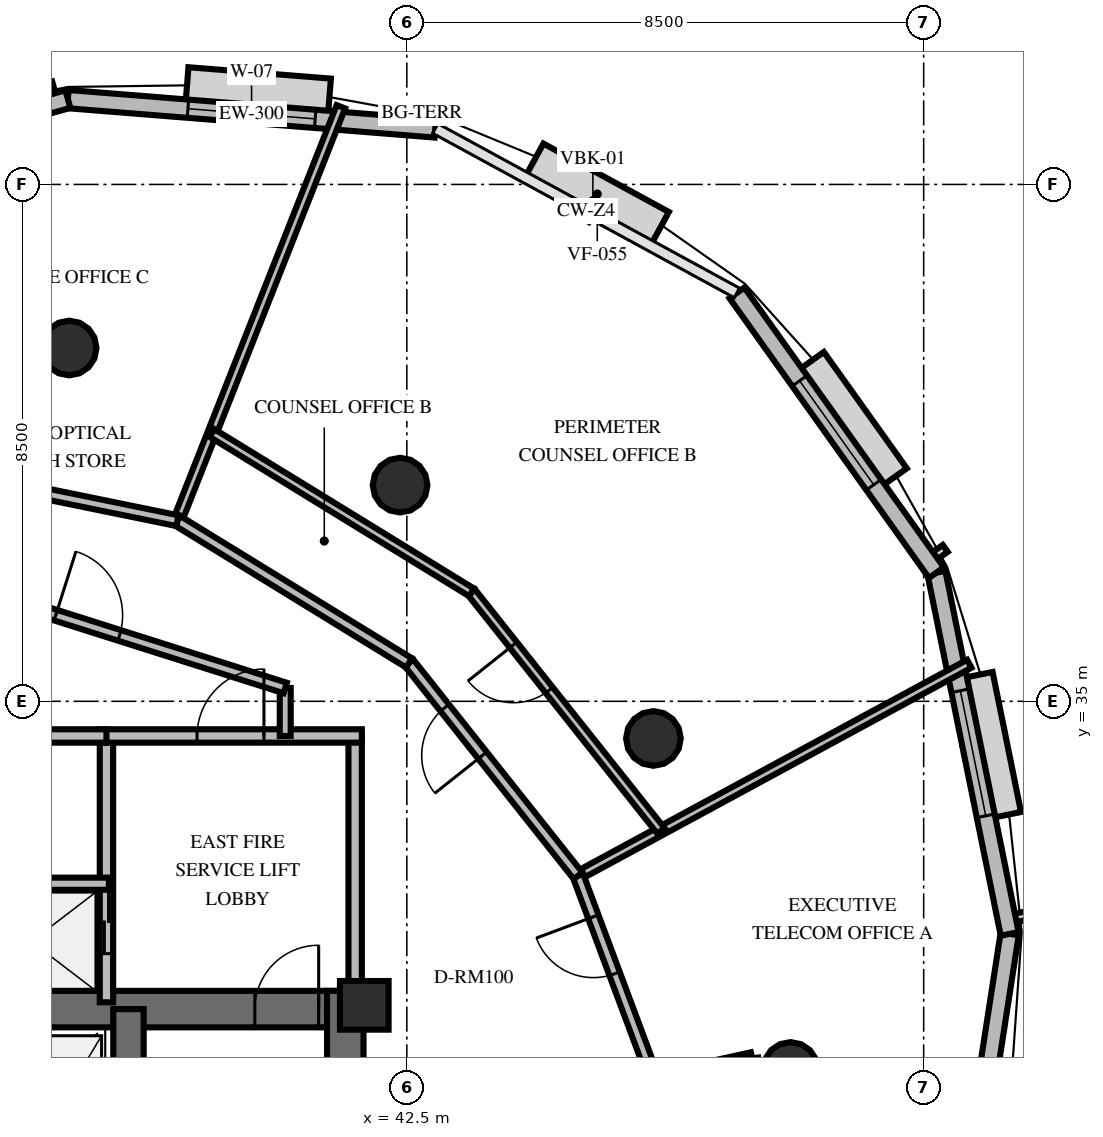
"""IFC4 building model, lengths in metres.
Left out: names, types, materials, properties, quantities, classifications, styles, units other than length and angle.
Written with IfcOpenShell. Run it as: python <this file> out.ifc"""

import sys

from ifc_helpers import new_model, si_unit, direction, frame, frame_2d, origin, origin_2d, place, context, subcontext, project, spatial, rectangle, circle, extrude, element, fill, save


model = new_model("IFC4")
c1 = context("Model", 3, precision=1e-05, world=origin(), true_north=direction((0.0, 1.0)))
c2 = subcontext(c1, "Body", "Model", "MODEL_VIEW")
j1 = project(units=[si_unit("LENGTHUNIT", "METRE"), si_unit("PLANEANGLEUNIT", "RADIAN")], contexts=[c1])
p1 = place(None, origin())
s1 = spatial("IfcSite", under=j1, at=p1, CompositionType="ELEMENT")
p2 = place(p1, origin())
s2 = spatial("IfcBuilding", under=s1, at=p2, CompositionType="ELEMENT")
p3 = place(p2, frame((0.0, 0.0, 234.0)))
s3 = spatial("IfcBuildingStorey", under=s2, at=p3, CompositionType="ELEMENT", Elevation=234.0)
p4 = place(p3, frame((26.222, 29.938, 0.0), z_axis=(0.0, 0.0, 1.0), x_axis=(1.0, 0.0, 0.0)))
e1 = element("IfcWall", 1, at=p4, inside=s3, PredefinedType="SHEAR", context=c2, shape_type="SweptSolid", body=[
    extrude(rectangle(XDim=15.566, YDim=0.6, at=frame_2d((7.783, 0.0))), origin(), (0.0, 0.0, 1.0), 3.6),
])
p5 = place(p4, frame((0.728, 0.0, 0.0)))
e2 = element("IfcOpeningElement", 2, at=p5, cuts=e1, PredefinedType="OPENING", context=c2, shape_type="SweptSolid", body=[
    extrude(rectangle(XDim=1.05, YDim=2.15, at=frame_2d((0.525, 1.075))), frame((0.0, 0.31, 0.0), z_axis=(0.0, -1.0, 0.0), x_axis=(1.0, 0.0, 0.0)), (0.0, 0.0, 1.0), 0.62),
])
p6 = place(p4, frame((13.778, 0.0, 0.0)))
e3 = element("IfcOpeningElement", 3, at=p6, cuts=e1, PredefinedType="OPENING", context=c2, shape_type="SweptSolid", body=[
    extrude(rectangle(XDim=1.05, YDim=2.15, at=frame_2d((0.525, 1.075))), frame((0.0, 0.31, 0.0), z_axis=(0.0, -1.0, 0.0), x_axis=(1.0, 0.0, 0.0)), (0.0, 0.0, 1.0), 0.62),
])
p7 = place(p4, frame((7.228, 0.0, 0.0)))
e4 = element("IfcOpeningElement", 4, at=p7, cuts=e1, PredefinedType="OPENING", context=c2, shape_type="SweptSolid", body=[
    extrude(rectangle(XDim=1.1, YDim=2.15, at=frame_2d((0.55, 1.075))), frame((0.0, 0.31, 0.0), z_axis=(0.0, -1.0, 0.0), x_axis=(1.0, 0.0, 0.0)), (0.0, 0.0, 1.0), 0.62),
])
p8 = place(p3, frame((41.488, 19.962, 0.0), z_axis=(0.0, 0.0, 1.0), x_axis=(0.0, 1.0, 0.0)))
e5 = element("IfcWall", 5, at=p8, inside=s3, PredefinedType="SHEAR", context=c2, shape_type="SweptSolid", body=[
    extrude(rectangle(XDim=10.276, YDim=0.6, at=frame_2d((5.138, 0.0))), origin(), (0.0, 0.0, 1.0), 3.6),
])
p9 = place(p3, frame((37.922, 20.262, 0.0), z_axis=(0.0, 0.0, 1.0), x_axis=(0.0, 1.0, 0.0)))
e6 = element("IfcWall", 6, at=p9, inside=s3, PredefinedType="SHEAR", context=c2, shape_type="SweptSolid", body=[
    extrude(rectangle(XDim=9.676, YDim=0.5, at=frame_2d((4.838, 0.0))), origin(), (0.0, 0.0, 1.0), 3.6),
])
p10 = place(p3, frame((41.8, 30.0, 0.0), z_axis=(0.0, 0.0, 1.0), x_axis=(1.0, 0.0, 0.0)))
e7 = element("IfcColumn", 7, at=p10, inside=s3, PredefinedType="PILASTER", context=c2, shape_type="SweptSolid", body=[
    extrude(rectangle(XDim=0.8, YDim=0.8, at=origin_2d()), origin(), (0.0, 0.0, 1.0), 3.6),
])
for number, where, z_axis, x_axis in (
    (8, (48.81, 28.946, 0.0), (0.0, 0.0, 1.0), (1.0, 0.0, 0.0)),
    (9, (46.555, 34.389, 0.0), (0.0, 0.0, 1.0), (1.0, 0.0, 0.0)),
    (10, (42.389, 38.555, 0.0), (0.0, 0.0, 1.0), (1.0, 0.0, 0.0)),
    (11, (36.946, 40.81, 0.0), (0.0, 0.0, 1.0), (1.0, 0.0, 0.0)),
):
    element("IfcColumn", number, at=place(p3, frame(where, z_axis=z_axis, x_axis=x_axis)), inside=s3, PredefinedType="COLUMN", context=c2, shape_type="SweptSolid", body=[
        extrude(circle(Radius=0.45, at=origin_2d()), origin(), (0.0, 0.0, 1.0), 3.6),
    ])
p11 = place(p3, frame((42.968, 44.42, 0.0), z_axis=(0.0, 0.0, 1.0), x_axis=(-0.996821678443, 0.079665183029, 0.0)))
e12 = element("IfcWall", 12, at=p11, inside=s3, PredefinedType="SOLIDWALL", context=c2, shape_type="SweptSolid", body=[
    extrude(rectangle(XDim=6.062, YDim=0.3, at=frame_2d((3.031, 0.0))), origin(), (0.0, 0.0, 1.0), 2.76),
])
p12 = place(p11, frame((1.981, 0.0, 0.8)))
e13 = element("IfcOpeningElement", 13, at=p12, cuts=e12, PredefinedType="OPENING", context=c2, shape_type="SweptSolid", body=[
    extrude(rectangle(XDim=2.1, YDim=1.85, at=frame_2d((1.05, 0.925))), frame((0.0, 0.16, 0.0), z_axis=(0.0, -1.0, 0.0), x_axis=(1.0, 0.0, 0.0)), (0.0, 0.0, 1.0), 0.32),
])
p13 = place(p3, frame((36.925, 44.903, 0.0), z_axis=(0.0, 0.0, 1.0), x_axis=(-0.962704799022, -0.270554005589, 0.0)))
e14 = element("IfcWall", 14, at=p13, inside=s3, PredefinedType="SOLIDWALL", context=c2, shape_type="SweptSolid", body=[
    extrude(rectangle(XDim=6.643, YDim=0.3, at=frame_2d((3.322, 0.0))), origin(), (0.0, 0.0, 1.0), 2.76),
])
p14 = place(p13, frame((2.272, 0.0, 0.8)))
e15 = element("IfcOpeningElement", 15, at=p14, cuts=e14, PredefinedType="OPENING", context=c2, shape_type="SweptSolid", body=[
    extrude(rectangle(XDim=2.1, YDim=1.85, at=frame_2d((1.05, 0.925))), frame((0.0, 0.16, 0.0), z_axis=(0.0, -1.0, 0.0), x_axis=(1.0, 0.0, 0.0)), (0.0, 0.0, 1.0), 0.32),
])
p15 = place(p3, frame((51.399, 24.61, 0.0), z_axis=(0.0, 0.0, 1.0), x_axis=(0.15291596783, 0.988239195126, 0.0)))
e16 = element("IfcWall", 16, at=p15, inside=s3, PredefinedType="SOLIDWALL", context=c2, shape_type="SweptSolid", body=[
    extrude(rectangle(XDim=6.643, YDim=0.3, at=frame_2d((3.322, 0.0))), origin(), (0.0, 0.0, 1.0), 2.76),
])
p16 = place(p15, frame((2.272, 0.0, 0.8)))
e17 = element("IfcOpeningElement", 17, at=p16, cuts=e16, PredefinedType="OPENING", context=c2, shape_type="SweptSolid", body=[
    extrude(rectangle(XDim=2.1, YDim=1.85, at=frame_2d((1.05, 0.925))), frame((0.0, 0.16, 0.0), z_axis=(0.0, -1.0, 0.0), x_axis=(1.0, 0.0, 0.0)), (0.0, 0.0, 1.0), 0.32),
])
p17 = place(p3, frame((52.415, 31.175, 0.0), z_axis=(0.0, 0.0, 1.0), x_axis=(-0.198803056685, 0.980039460763, 0.0)))
e18 = element("IfcWall", 18, at=p17, inside=s3, PredefinedType="SOLIDWALL", context=c2, shape_type="SweptSolid", body=[
    extrude(rectangle(XDim=6.062, YDim=0.3, at=frame_2d((3.031, 0.0))), origin(), (0.0, 0.0, 1.0), 2.76),
])
p18 = place(p17, frame((1.981, 0.0, 0.8)))
e19 = element("IfcOpeningElement", 19, at=p18, cuts=e18, PredefinedType="OPENING", context=c2, shape_type="SweptSolid", body=[
    extrude(rectangle(XDim=2.1, YDim=1.85, at=frame_2d((1.05, 0.925))), frame((0.0, 0.16, 0.0), z_axis=(0.0, -1.0, 0.0), x_axis=(1.0, 0.0, 0.0)), (0.0, 0.0, 1.0), 0.32),
])
p19 = place(p3, frame((51.21, 37.116, 0.0), z_axis=(0.0, 0.0, 1.0), x_axis=(-0.580678098199, 0.814133248475, 0.0)))
e20 = element("IfcWall", 20, at=p19, inside=s3, PredefinedType="SOLIDWALL", context=c2, shape_type="SweptSolid", body=[
    extrude(rectangle(XDim=5.65, YDim=0.3, at=frame_2d((2.825, 0.0))), origin(), (0.0, 0.0, 1.0), 2.76),
])
p20 = place(p19, frame((1.775, 0.0, 0.8)))
e21 = element("IfcOpeningElement", 21, at=p20, cuts=e20, PredefinedType="OPENING", context=c2, shape_type="SweptSolid", body=[
    extrude(rectangle(XDim=2.1, YDim=1.85, at=frame_2d((1.05, 0.925))), frame((0.0, 0.16, 0.0), z_axis=(0.0, -1.0, 0.0), x_axis=(1.0, 0.0, 0.0)), (0.0, 0.0, 1.0), 0.32),
])
p21 = place(p3, frame((37.56, 30.05, 0.0), z_axis=(0.0, 0.0, 1.0), x_axis=(0.0, 1.0, 0.0)))
e22 = element("IfcWall", 22, at=p21, inside=s3, PredefinedType="SOLIDWALL", context=c2, shape_type="SweptSolid", body=[
    extrude(rectangle(XDim=4.38, YDim=0.22, at=frame_2d((2.19, 0.0))), origin(), (0.0, 0.0, 1.0), 2.46),
])
p22 = place(p21, frame((0.8, 0.0, 0.0)))
e23 = element("IfcOpeningElement", 23, at=p22, cuts=e22, PredefinedType="OPENING", context=c2, shape_type="SweptSolid", body=[
    extrude(rectangle(XDim=1.05, YDim=2.1, at=frame_2d((0.525, 1.05))), frame((0.0, 0.12, 0.0), z_axis=(0.0, -1.0, 0.0), x_axis=(1.0, 0.0, 0.0)), (0.0, 0.0, 1.0), 0.24),
])
p23 = place(p3, frame((41.65, 30.05, 0.0), z_axis=(0.0, 0.0, 1.0), x_axis=(0.0, 1.0, 0.0)))
e24 = element("IfcWall", 24, at=p23, inside=s3, PredefinedType="SOLIDWALL", context=c2, shape_type="SweptSolid", body=[
    extrude(rectangle(XDim=4.38, YDim=0.22, at=frame_2d((2.19, 0.0))), origin(), (0.0, 0.0, 1.0), 2.46),
])
p24 = place(p3, frame((37.45, 34.43, 0.0), z_axis=(0.0, 0.0, 1.0), x_axis=(1.0, 0.0, 0.0)))
e25 = element("IfcWall", 25, at=p24, inside=s3, PredefinedType="SOLIDWALL", context=c2, shape_type="SweptSolid", body=[
    extrude(rectangle(XDim=4.31, YDim=0.22, at=frame_2d((2.155, 0.0))), origin(), (0.0, 0.0, 1.0), 2.46),
])
p25 = place(p24, frame((1.6, 0.0, 0.0)))
e26 = element("IfcOpeningElement", 26, at=p25, cuts=e25, PredefinedType="OPENING", context=c2, shape_type="SweptSolid", body=[
    extrude(rectangle(XDim=1.1, YDim=2.15, at=frame_2d((0.55, 1.075))), frame((0.0, 0.12, 0.0), z_axis=(0.0, -1.0, 0.0), x_axis=(1.0, 0.0, 0.0)), (0.0, 0.0, 1.0), 0.24),
])
p26 = place(p3, frame((35.05, 32.0, 0.0), z_axis=(0.0, 0.0, 1.0), x_axis=(1.0, 0.0, 0.0)))
e27 = element("IfcWall", 27, at=p26, inside=s3, PredefinedType="SOLIDWALL", context=c2, shape_type="SweptSolid", body=[
    extrude(rectangle(XDim=2.55, YDim=0.2, at=frame_2d((1.275, 0.0))), origin(), (0.0, 0.0, 1.0), 2.46),
])
p27 = place(p3, frame((30.44, 34.43, 0.0), z_axis=(0.0, 0.0, 1.0), x_axis=(1.0, 0.0, 0.0)))
e28 = element("IfcWall", 28, at=p27, inside=s3, PredefinedType="SOLIDWALL", context=c2, shape_type="SweptSolid", body=[
    extrude(rectangle(XDim=7.12, YDim=0.22, at=frame_2d((3.56, 0.0))), origin(), (0.0, 0.0, 1.0), 2.46),
])
p28 = place(p27, frame((3.01, 0.0, 0.0)))
e29 = element("IfcOpeningElement", 29, at=p28, cuts=e28, PredefinedType="OPENING", context=c2, shape_type="SweptSolid", body=[
    extrude(rectangle(XDim=1.1, YDim=2.15, at=frame_2d((0.55, 1.075))), frame((0.0, 0.12, 0.0), z_axis=(0.0, -1.0, 0.0), x_axis=(1.0, 0.0, 0.0)), (0.0, 0.0, 1.0), 0.24),
])
p29 = place(p3, frame((40.5, 35.219, 0.0), z_axis=(0.0, 0.0, 1.0), x_axis=(0.0, -1.0, 0.0)))
e30 = element("IfcWall", 30, at=p29, inside=s3, PredefinedType="PARTITIONING", context=c2, shape_type="SweptSolid", body=[
    extrude(rectangle(XDim=0.789, YDim=0.18, at=frame_2d((0.395, 0.0))), origin(), (0.0, 0.0, 1.0), 2.46),
])
p30 = place(p3, frame((34.0, 37.28, 0.0), z_axis=(0.0, 0.0, 1.0), x_axis=(0.953228121756, -0.302251795518, 0.0)))
e31 = element("IfcWall", 31, at=p30, inside=s3, PredefinedType="PARTITIONING", context=c2, shape_type="SweptSolid", body=[
    extrude(rectangle(XDim=6.819, YDim=0.18, at=frame_2d((3.409, 0.0))), origin(), (0.0, 0.0, 1.0), 2.46),
])
p31 = place(p30, frame((2.86, 0.0, 0.0)))
e32 = element("IfcOpeningElement", 32, at=p31, cuts=e31, PredefinedType="OPENING", context=c2, shape_type="SweptSolid", body=[
    extrude(rectangle(XDim=1.1, YDim=2.15, at=frame_2d((0.55, 1.075))), frame((0.0, 0.1, 0.0), z_axis=(0.0, -1.0, 0.0), x_axis=(1.0, 0.0, 0.0)), (0.0, 0.0, 1.0), 0.2),
])
p32 = place(p3, frame((46.567, 28.775, 0.0), z_axis=(0.0, 0.0, 1.0), x_axis=(0.976488977009, 0.215567339318, 0.0)))
e33 = element("IfcWall", 33, at=p32, inside=s3, PredefinedType="PLUMBINGWALL", context=c2, shape_type="SweptSolid", body=[
    extrude(rectangle(XDim=1.65, YDim=0.2, at=frame_2d((0.825, 0.0))), origin(), (0.0, 0.0, 1.0), 2.46),
])
p33 = place(p3, frame((45.316, 32.131, 0.0), z_axis=(0.0, 0.0, 1.0), x_axis=(0.879230834662, 0.476395990096, 0.0)))
e34 = element("IfcWall", 34, at=p33, inside=s3, PredefinedType="PARTITIONING", context=c2, shape_type="SweptSolid", body=[
    extrude(rectangle(XDim=7.318, YDim=0.15, at=frame_2d((3.659, 0.0))), origin(), (0.0, 0.0, 1.0), 2.46),
])
p34 = place(p3, frame((46.567, 28.775, 0.0), z_axis=(0.0, 0.0, 1.0), x_axis=(-0.349419971737, 0.936966212492, 0.0)))
e35 = element("IfcWall", 35, at=p34, inside=s3, PredefinedType="PARTITIONING", context=c2, shape_type="SweptSolid", body=[
    extrude(rectangle(XDim=3.582, YDim=0.18, at=frame_2d((1.791, 0.0))), origin(), (0.0, 0.0, 1.0), 2.46),
])
p35 = place(p34, frame((1.862, 0.0, 0.0)))
e36 = element("IfcOpeningElement", 36, at=p35, cuts=e35, PredefinedType="OPENING", context=c2, shape_type="SweptSolid", body=[
    extrude(rectangle(XDim=1.0, YDim=2.15, at=frame_2d((0.5, 1.075))), frame((0.0, 0.1, 0.0), z_axis=(0.0, -1.0, 0.0), x_axis=(1.0, 0.0, 0.0)), (0.0, 0.0, 1.0), 0.2),
])
p36 = place(p3, frame((38.727, 37.97, 0.0), z_axis=(0.0, 0.0, 1.0), x_axis=(0.367303252397, 0.93010124222, 0.0)))
e37 = element("IfcWall", 37, at=p36, inside=s3, PredefinedType="PARTITIONING", context=c2, shape_type="SweptSolid", body=[
    extrude(rectangle(XDim=7.318, YDim=0.15, at=frame_2d((3.659, 0.0))), origin(), (0.0, 0.0, 1.0), 2.46),
])
p37 = place(p3, frame((45.316, 32.131, 0.0), z_axis=(0.0, 0.0, 1.0), x_axis=(-0.621813175889, 0.783165611024, 0.0)))
e38 = element("IfcWall", 38, at=p37, inside=s3, PredefinedType="PARTITIONING", context=c2, shape_type="SweptSolid", body=[
    extrude(rectangle(XDim=4.47, YDim=0.18, at=frame_2d((2.235, 0.0))), origin(), (0.0, 0.0, 1.0), 2.46),
])
p38 = place(p37, frame((2.527, 0.0, 0.0)))
e39 = element("IfcOpeningElement", 39, at=p38, cuts=e38, PredefinedType="OPENING", context=c2, shape_type="SweptSolid", body=[
    extrude(rectangle(XDim=1.0, YDim=2.15, at=frame_2d((0.5, 1.075))), frame((0.0, 0.1, 0.0), z_axis=(0.0, -1.0, 0.0), x_axis=(1.0, 0.0, 0.0)), (0.0, 0.0, 1.0), 0.2),
])
p39 = place(p3, frame((42.536, 35.632, 0.0), z_axis=(0.0, 0.0, 1.0), x_axis=(-0.852175498572, 0.523256074626, 0.0)))
e40 = element("IfcWall", 40, at=p39, inside=s3, PredefinedType="PARTITIONING", context=c2, shape_type="SweptSolid", body=[
    extrude(rectangle(XDim=4.47, YDim=0.18, at=frame_2d((2.235, 0.0))), origin(), (0.0, 0.0, 1.0), 2.46),
])
p40 = place(p3, frame((46.678, 32.87, 0.0), z_axis=(0.0, 0.0, 1.0), x_axis=(-0.621831140241, 0.783151347459, 0.0)))
e41 = element("IfcWall", 41, at=p40, inside=s3, PredefinedType="PARTITIONING", context=c2, shape_type="SweptSolid", body=[
    extrude(rectangle(XDim=5.008, YDim=0.15, at=frame_2d((2.504, 0.0))), origin(), (0.0, 0.0, 1.0), 2.46),
])
p41 = place(p40, frame((2.954, 0.0, 0.0)))
e42 = element("IfcOpeningElement", 42, at=p41, cuts=e41, PredefinedType="OPENING", context=c2, shape_type="SweptSolid", body=[
    extrude(rectangle(XDim=0.95, YDim=2.15, at=frame_2d((0.475, 1.075))), frame((0.0, 0.085, 0.0), z_axis=(0.0, -1.0, 0.0), x_axis=(1.0, 0.0, 0.0)), (0.0, 0.0, 1.0), 0.17),
])
p42 = place(p3, frame((43.564, 36.792, 0.0), z_axis=(0.0, 0.0, 1.0), x_axis=(-0.852170081645, 0.523264896538, 0.0)))
e43 = element("IfcWall", 43, at=p42, inside=s3, PredefinedType="PARTITIONING", context=c2, shape_type="SweptSolid", body=[
    extrude(rectangle(XDim=5.008, YDim=0.15, at=frame_2d((2.504, 0.0))), origin(), (0.0, 0.0, 1.0), 2.46),
])
p43 = place(p3, frame((38.727, 37.97, 0.0), z_axis=(0.0, 0.0, 1.0), x_axis=(-0.979757075519, 0.200190092088, 0.0)))
e44 = element("IfcWall", 44, at=p43, inside=s3, PredefinedType="PARTITIONING", context=c2, shape_type="SweptSolid", body=[
    extrude(rectangle(XDim=4.47, YDim=0.18, at=frame_2d((2.235, 0.0))), origin(), (0.0, 0.0, 1.0), 2.46),
])
p44 = place(p12, origin())
e45 = element("IfcWindow", 45, at=p44, inside=s3, PartitioningType="SINGLE_PANEL", PredefinedType="WINDOW", context=c2, shape_type="SweptSolid", body=[
    extrude(rectangle(XDim=2.1, YDim=1.85, at=frame_2d((1.05, 0.925))), frame((0.0, 0.03, 0.0), z_axis=(0.0, -1.0, 0.0), x_axis=(1.0, 0.0, 0.0)), (0.0, 0.0, 1.0), 0.06),
])
fill(e13, e45)
p45 = place(p18, origin())
e46 = element("IfcWindow", 46, at=p45, inside=s3, PartitioningType="SINGLE_PANEL", PredefinedType="WINDOW", context=c2, shape_type="SweptSolid", body=[
    extrude(rectangle(XDim=2.1, YDim=1.85, at=frame_2d((1.05, 0.925))), frame((0.0, 0.03, 0.0), z_axis=(0.0, -1.0, 0.0), x_axis=(1.0, 0.0, 0.0)), (0.0, 0.0, 1.0), 0.06),
])
fill(e19, e46)
p46 = place(p20, origin())
e47 = element("IfcWindow", 47, at=p46, inside=s3, PartitioningType="SINGLE_PANEL", PredefinedType="WINDOW", context=c2, shape_type="SweptSolid", body=[
    extrude(rectangle(XDim=2.1, YDim=1.85, at=frame_2d((1.05, 0.925))), frame((0.0, 0.03, 0.0), z_axis=(0.0, -1.0, 0.0), x_axis=(1.0, 0.0, 0.0)), (0.0, 0.0, 1.0), 0.06),
])
fill(e21, e47)
p47 = place(p6, origin())
e48 = element("IfcDoor", 48, at=p47, inside=s3, OperationType="SINGLE_SWING_RIGHT", PredefinedType="DOOR", context=c2, shape_type="SweptSolid", body=[
    extrude(rectangle(XDim=1.05, YDim=2.15, at=frame_2d((0.525, 1.075))), frame((0.0, 0.025, 0.0), z_axis=(0.0, -1.0, 0.0), x_axis=(1.0, 0.0, 0.0)), (0.0, 0.0, 1.0), 0.05),
])
fill(e3, e48)
p48 = place(p25, origin())
e49 = element("IfcDoor", 49, at=p48, inside=s3, OperationType="SINGLE_SWING_RIGHT", PredefinedType="DOOR", context=c2, shape_type="SweptSolid", body=[
    extrude(rectangle(XDim=1.1, YDim=2.15, at=frame_2d((0.55, 1.075))), frame((0.0, 0.025, 0.0), z_axis=(0.0, -1.0, 0.0), x_axis=(1.0, 0.0, 0.0)), (0.0, 0.0, 1.0), 0.05),
])
fill(e26, e49)
p49 = place(p22, origin())
e50 = element("IfcDoor", 50, at=p49, inside=s3, OperationType="DOUBLE_DOOR_SLIDING", PredefinedType="USERDEFINED", context=c2, shape_type="SweptSolid", body=[
    extrude(rectangle(XDim=1.05, YDim=2.1, at=frame_2d((0.525, 1.05))), frame((0.0, 0.025, 0.0), z_axis=(0.0, -1.0, 0.0), x_axis=(1.0, 0.0, 0.0)), (0.0, 0.0, 1.0), 0.05),
])
fill(e23, e50)
p50 = place(p31, origin())
e51 = element("IfcDoor", 51, at=p50, inside=s3, OperationType="SINGLE_SWING_LEFT", PredefinedType="DOOR", context=c2, shape_type="SweptSolid", body=[
    extrude(rectangle(XDim=1.1, YDim=2.15, at=frame_2d((0.55, 1.075))), frame((0.0, 0.025, 0.0), z_axis=(0.0, -1.0, 0.0), x_axis=(1.0, 0.0, 0.0)), (0.0, 0.0, 1.0), 0.05),
])
fill(e32, e51)
p51 = place(p35, origin())
e52 = element("IfcDoor", 52, at=p51, inside=s3, OperationType="SINGLE_SWING_RIGHT", PredefinedType="DOOR", context=c2, shape_type="SweptSolid", body=[
    extrude(rectangle(XDim=1.0, YDim=2.15, at=frame_2d((0.5, 1.075))), frame((0.0, 0.025, 0.0), z_axis=(0.0, -1.0, 0.0), x_axis=(1.0, 0.0, 0.0)), (0.0, 0.0, 1.0), 0.05),
])
fill(e36, e52)
p52 = place(p38, origin())
e53 = element("IfcDoor", 53, at=p52, inside=s3, OperationType="SINGLE_SWING_LEFT", PredefinedType="DOOR", context=c2, shape_type="SweptSolid", body=[
    extrude(rectangle(XDim=1.0, YDim=2.15, at=frame_2d((0.5, 1.075))), frame((0.0, 0.025, 0.0), z_axis=(0.0, -1.0, 0.0), x_axis=(1.0, 0.0, 0.0)), (0.0, 0.0, 1.0), 0.05),
])
fill(e39, e53)
p53 = place(p41, origin())
e54 = element("IfcDoor", 54, at=p53, inside=s3, OperationType="SINGLE_SWING_RIGHT", PredefinedType="DOOR", context=c2, shape_type="SweptSolid", body=[
    extrude(rectangle(XDim=0.95, YDim=2.15, at=frame_2d((0.475, 1.075))), frame((0.0, 0.025, 0.0), z_axis=(0.0, -1.0, 0.0), x_axis=(1.0, 0.0, 0.0)), (0.0, 0.0, 1.0), 0.05),
])
fill(e42, e54)
save(model, sys.argv[1])
